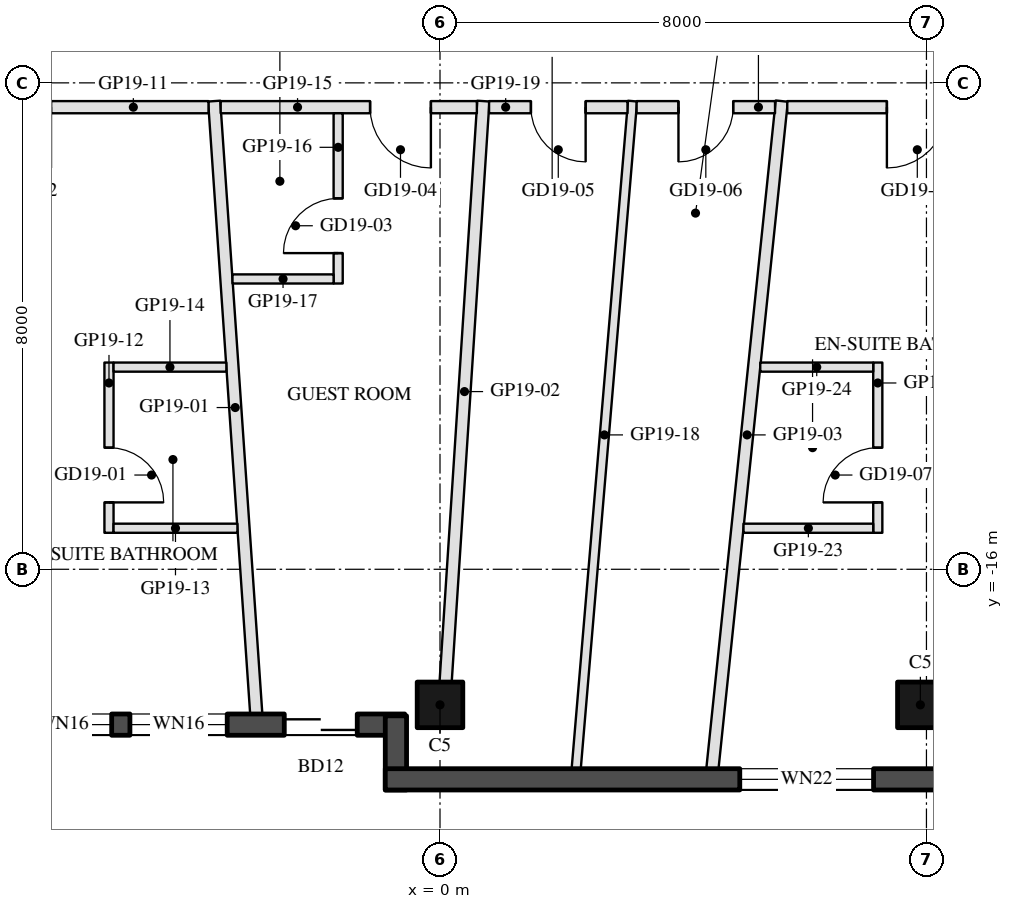
"""IFC4 building model, lengths in metres.
Left out: names, types, materials, properties, quantities, classifications, styles, units other than length and angle.
Written with IfcOpenShell. Run it as: python <this file> out.ifc"""

import sys

from ifc_helpers import new_model, si_unit, direction, frame, frame_2d, origin, origin_2d, place, context, subcontext, project, spatial, rectangle, hollow_rectangle, extrude, element, fill, save


model = new_model("IFC4")
c1 = context("Model", 3, precision=1e-05, world=origin(), true_north=direction((0.0, 1.0)))
c2 = subcontext(c1, "Body", "Model", "MODEL_VIEW")
j1 = project(units=[si_unit("LENGTHUNIT", "METRE"), si_unit("PLANEANGLEUNIT", "RADIAN")], contexts=[c1])
p1 = place(None, origin())
s1 = spatial("IfcSite", under=j1, at=p1, CompositionType="ELEMENT")
p2 = place(p1, origin())
s2 = spatial("IfcBuilding", under=s1, at=p2, CompositionType="ELEMENT")
p3 = place(p2, frame((0.0, 0.0, 202.1)))
s3 = spatial("IfcBuildingStorey", under=s2, at=p3, CompositionType="ELEMENT", Elevation=202.1)
for number, where, z_axis, x_axis in (
    (1, (0.0, -18.23, 0.0), (0.0, 0.0, 1.0), (-1.0, 0.0, 0.0)),
    (2, (7.9, -18.23, 0.0), (0.0, 0.0, 1.0), (-1.0, 0.0, 0.0)),
):
    element("IfcColumn", number, at=place(p3, frame(where, z_axis=z_axis, x_axis=x_axis)), inside=s3, PredefinedType="COLUMN", context=c2, shape_type="SweptSolid", body=[
        extrude(hollow_rectangle(XDim=0.75, YDim=0.75, WallThickness=0.035, at=origin_2d()), origin(), (0.0, 0.0, 1.0), 3.7),
    ])
p4 = place(p3, frame((-7.32, -18.555, 0.0), z_axis=(0.0, 0.0, 1.0), x_axis=(1.0, 0.0, 0.0)))
e3 = element("IfcWall", 3, at=p4, inside=s3, PredefinedType="SOLIDWALL", context=c2, shape_type="SweptSolid", body=[
    extrude(rectangle(XDim=6.74, YDim=0.35, at=frame_2d((3.37, 0.0))), origin(), (0.0, 0.0, 1.0), 3.55),
])
p5 = place(p4, frame((0.32, 0.0, 0.3)))
e4 = element("IfcOpeningElement", 4, at=p5, cuts=e3, PredefinedType="OPENING", context=c2, shape_type="SweptSolid", body=[
    extrude(rectangle(XDim=1.6, YDim=2.65, at=frame_2d((0.8, 1.325))), frame((0.0, 0.185, 0.0), z_axis=(0.0, -1.0, 0.0), x_axis=(1.0, 0.0, 0.0)), (0.0, 0.0, 1.0), 0.37),
])
p6 = place(p4, frame((2.22, 0.0, 0.3)))
e5 = element("IfcOpeningElement", 5, at=p6, cuts=e3, PredefinedType="OPENING", context=c2, shape_type="SweptSolid", body=[
    extrude(rectangle(XDim=1.6, YDim=2.65, at=frame_2d((0.8, 1.325))), frame((0.0, 0.185, 0.0), z_axis=(0.0, -1.0, 0.0), x_axis=(1.0, 0.0, 0.0)), (0.0, 0.0, 1.0), 0.37),
])
p7 = place(p4, frame((4.759, 0.0, 0.0)))
e6 = element("IfcOpeningElement", 6, at=p7, cuts=e3, PredefinedType="OPENING", context=c2, shape_type="SweptSolid", body=[
    extrude(rectangle(XDim=1.2, YDim=2.4, at=frame_2d((0.6, 1.2))), frame((0.0, 0.185, 0.0), z_axis=(0.0, -1.0, 0.0), x_axis=(1.0, 0.0, 0.0)), (0.0, 0.0, 1.0), 0.37),
])
p8 = place(p3, frame((-0.725, -18.41, 0.0), z_axis=(0.0, 0.0, 1.0), x_axis=(0.0, -1.0, 0.0)))
e7 = element("IfcWall", 7, at=p8, inside=s3, PredefinedType="SOLIDWALL", context=c2, shape_type="SweptSolid", body=[
    extrude(rectangle(XDim=1.22, YDim=0.35, at=frame_2d((0.61, 0.0))), origin(), (0.0, 0.0, 1.0), 3.55),
])
p9 = place(p3, frame((-0.9, -19.455, 0.0), z_axis=(0.0, 0.0, 1.0), x_axis=(1.0, 0.0, 0.0)))
e8 = element("IfcWall", 8, at=p9, inside=s3, PredefinedType="SOLIDWALL", context=c2, shape_type="SweptSolid", body=[
    extrude(rectangle(XDim=9.7, YDim=0.35, at=frame_2d((4.85, 0.0))), origin(), (0.0, 0.0, 1.0), 3.55),
])
p10 = place(p9, frame((5.83, 0.0, 0.3)))
e9 = element("IfcOpeningElement", 9, at=p10, cuts=e8, PredefinedType="OPENING", context=c2, shape_type="SweptSolid", body=[
    extrude(rectangle(XDim=2.2, YDim=2.65, at=frame_2d((1.1, 1.325))), frame((0.0, 0.185, 0.0), z_axis=(0.0, -1.0, 0.0), x_axis=(1.0, 0.0, 0.0)), (0.0, 0.0, 1.0), 0.37),
])
p11 = place(p3, frame((-3.022, -18.38, 0.0), z_axis=(0.0, 0.0, 1.0), x_axis=(-0.068480322914, 0.997652467232, 0.0)))
e10 = element("IfcWall", 10, at=p11, inside=s3, PredefinedType="PARTITIONING", context=c2, shape_type="SweptSolid", body=[
    extrude(rectangle(XDim=10.104, YDim=0.2, at=frame_2d((5.052, 0.0))), origin(), (0.0, 0.0, 1.0), 3.06),
])
p12 = place(p3, frame((0.093, -17.855, 0.0), z_axis=(0.0, 0.0, 1.0), x_axis=(0.064789362054, 0.997898962102, 0.0)))
e11 = element("IfcWall", 11, at=p12, inside=s3, PredefinedType="PARTITIONING", context=c2, shape_type="SweptSolid", body=[
    extrude(rectangle(XDim=9.575, YDim=0.2, at=frame_2d((4.788, 0.0))), origin(), (0.0, 0.0, 1.0), 2.95),
])
p13 = place(p3, frame((4.48, -19.28, 0.0), z_axis=(0.0, 0.0, 1.0), x_axis=(0.103348095524, 0.994645248896, 0.0)))
e12 = element("IfcWall", 12, at=p13, inside=s3, PredefinedType="PARTITIONING", context=c2, shape_type="SweptSolid", body=[
    extrude(rectangle(XDim=11.039, YDim=0.2, at=frame_2d((5.52, 0.0))), origin(), (0.0, 0.0, 1.0), 3.06),
])
p14 = place(p3, frame((-3.807, -8.4, 0.0), z_axis=(0.0, 0.0, 1.0), x_axis=(-1.0, 0.0, 0.0)))
e13 = element("IfcWall", 13, at=p14, inside=s3, PredefinedType="PARTITIONING", context=c2, shape_type="SweptSolid", body=[
    extrude(rectangle(XDim=6.181, YDim=0.2, at=frame_2d((3.091, 0.0))), origin(), (0.0, 0.0, 1.0), 2.95),
])
p15 = place(p14, frame((2.591, 0.0, 0.0)))
e14 = element("IfcOpeningElement", 14, at=p15, cuts=e13, PredefinedType="OPENING", context=c2, shape_type="SweptSolid", body=[
    extrude(rectangle(XDim=1.0, YDim=2.1, at=frame_2d((0.5, 1.05))), frame((0.0, 0.11, 0.0), z_axis=(0.0, -1.0, 0.0), x_axis=(1.0, 0.0, 0.0)), (0.0, 0.0, 1.0), 0.22),
])
p16 = place(p3, frame((-5.444, -12.6, 0.0), z_axis=(0.0, 0.0, 1.0), x_axis=(0.0, -1.0, 0.0)))
e15 = element("IfcWall", 15, at=p16, inside=s3, PredefinedType="PARTITIONING", context=c2, shape_type="SweptSolid", body=[
    extrude(rectangle(XDim=2.8, YDim=0.15, at=frame_2d((1.4, 0.0))), origin(), (0.0, 0.0, 1.0), 3.55),
])
p17 = place(p16, frame((1.4, 0.0, 0.0)))
e16 = element("IfcOpeningElement", 16, at=p17, cuts=e15, PredefinedType="OPENING", context=c2, shape_type="SweptSolid", body=[
    extrude(rectangle(XDim=0.9, YDim=2.1, at=frame_2d((0.45, 1.05))), frame((0.0, 0.085, 0.0), z_axis=(0.0, -1.0, 0.0), x_axis=(1.0, 0.0, 0.0)), (0.0, 0.0, 1.0), 0.17),
])
p18 = place(p3, frame((-5.369, -15.325, 0.0), z_axis=(0.0, 0.0, 1.0), x_axis=(1.0, 0.0, 0.0)))
e17 = element("IfcWall", 17, at=p18, inside=s3, PredefinedType="PARTITIONING", context=c2, shape_type="SweptSolid", body=[
    extrude(rectangle(XDim=2.037, YDim=0.15, at=frame_2d((1.019, 0.0))), origin(), (0.0, 0.0, 1.0), 2.95),
])
p19 = place(p3, frame((-5.369, -12.675, 0.0), z_axis=(0.0, 0.0, 1.0), x_axis=(1.0, 0.0, 0.0)))
e18 = element("IfcWall", 18, at=p19, inside=s3, PredefinedType="PARTITIONING", context=c2, shape_type="SweptSolid", body=[
    extrude(rectangle(XDim=1.855, YDim=0.15, at=frame_2d((0.928, 0.0))), origin(), (0.0, 0.0, 1.0), 2.95),
])
p20 = place(p3, frame((0.606, -8.4, 0.0), z_axis=(0.0, 0.0, 1.0), x_axis=(-1.0, 0.0, 0.0)))
e19 = element("IfcWall", 19, at=p20, inside=s3, PredefinedType="PARTITIONING", context=c2, shape_type="SweptSolid", body=[
    extrude(rectangle(XDim=4.213, YDim=0.2, at=frame_2d((2.106, 0.0))), origin(), (0.0, 0.0, 1.0), 2.95),
])
p21 = place(p20, frame((0.756, 0.0, 0.0)))
e20 = element("IfcOpeningElement", 20, at=p21, cuts=e19, PredefinedType="OPENING", context=c2, shape_type="SweptSolid", body=[
    extrude(rectangle(XDim=1.0, YDim=2.1, at=frame_2d((0.5, 1.05))), frame((0.0, 0.11, 0.0), z_axis=(0.0, -1.0, 0.0), x_axis=(1.0, 0.0, 0.0)), (0.0, 0.0, 1.0), 0.22),
])
p22 = place(p3, frame((-1.675, -11.3, 0.0), z_axis=(0.0, 0.0, 1.0), x_axis=(0.0, 1.0, 0.0)))
e21 = element("IfcWall", 21, at=p22, inside=s3, PredefinedType="PARTITIONING", context=c2, shape_type="SweptSolid", body=[
    extrude(rectangle(XDim=2.8, YDim=0.15, at=frame_2d((1.4, 0.0))), origin(), (0.0, 0.0, 1.0), 3.55),
])
p23 = place(p22, frame((0.5, 0.0, 0.0)))
e22 = element("IfcOpeningElement", 22, at=p23, cuts=e21, PredefinedType="OPENING", context=c2, shape_type="SweptSolid", body=[
    extrude(rectangle(XDim=0.9, YDim=2.1, at=frame_2d((0.45, 1.05))), frame((0.0, 0.085, 0.0), z_axis=(0.0, -1.0, 0.0), x_axis=(1.0, 0.0, 0.0)), (0.0, 0.0, 1.0), 0.17),
])
p24 = place(p3, frame((-3.413, -11.225, 0.0), z_axis=(0.0, 0.0, 1.0), x_axis=(1.0, 0.0, 0.0)))
e23 = element("IfcWall", 23, at=p24, inside=s3, PredefinedType="PARTITIONING", context=c2, shape_type="SweptSolid", body=[
    extrude(rectangle(XDim=1.663, YDim=0.15, at=frame_2d((0.832, 0.0))), origin(), (0.0, 0.0, 1.0), 3.55),
])
p25 = place(p3, frame((2.24, -19.28, 0.0), z_axis=(0.0, 0.0, 1.0), x_axis=(0.084127266942, 0.99645501803, 0.0)))
e24 = element("IfcWall", 24, at=p25, inside=s3, PredefinedType="PARTITIONING", context=c2, shape_type="SweptSolid", body=[
    extrude(rectangle(XDim=11.019, YDim=0.15, at=frame_2d((5.51, 0.0))), origin(), (0.0, 0.0, 1.0), 3.06),
])
p26 = place(p3, frame((3.083, -8.4, 0.0), z_axis=(0.0, 0.0, 1.0), x_axis=(-1.0, 0.0, 0.0)))
e25 = element("IfcWall", 25, at=p26, inside=s3, PredefinedType="PARTITIONING", context=c2, shape_type="SweptSolid", body=[
    extrude(rectangle(XDim=2.277, YDim=0.2, at=frame_2d((1.138, 0.0))), origin(), (0.0, 0.0, 1.0), 3.55),
])
p27 = place(p26, frame((0.688, 0.0, 0.0)))
e26 = element("IfcOpeningElement", 26, at=p27, cuts=e25, PredefinedType="OPENING", context=c2, shape_type="SweptSolid", body=[
    extrude(rectangle(XDim=0.9, YDim=2.1, at=frame_2d((0.45, 1.05))), frame((0.0, 0.11, 0.0), z_axis=(0.0, -1.0, 0.0), x_axis=(1.0, 0.0, 0.0)), (0.0, 0.0, 1.0), 0.22),
])
p28 = place(p3, frame((5.51, -8.4, 0.0), z_axis=(0.0, 0.0, 1.0), x_axis=(-1.0, 0.0, 0.0)))
e27 = element("IfcWall", 27, at=p28, inside=s3, PredefinedType="PARTITIONING", context=c2, shape_type="SweptSolid", body=[
    extrude(rectangle(XDim=2.277, YDim=0.2, at=frame_2d((1.138, 0.0))), origin(), (0.0, 0.0, 1.0), 2.95),
])
p29 = place(p28, frame((0.688, 0.0, 0.0)))
e28 = element("IfcOpeningElement", 28, at=p29, cuts=e27, PredefinedType="OPENING", context=c2, shape_type="SweptSolid", body=[
    extrude(rectangle(XDim=0.9, YDim=2.1, at=frame_2d((0.45, 1.05))), frame((0.0, 0.11, 0.0), z_axis=(0.0, -1.0, 0.0), x_axis=(1.0, 0.0, 0.0)), (0.0, 0.0, 1.0), 0.22),
])
p30 = place(p3, frame((9.988, -8.4, 0.0), z_axis=(0.0, 0.0, 1.0), x_axis=(-1.0, 0.0, 0.0)))
e29 = element("IfcWall", 29, at=p30, inside=s3, PredefinedType="PARTITIONING", context=c2, shape_type="SweptSolid", body=[
    extrude(rectangle(XDim=4.277, YDim=0.2, at=frame_2d((2.139, 0.0))), origin(), (0.0, 0.0, 1.0), 2.95),
])
p31 = place(p30, frame((1.639, 0.0, 0.0)))
e30 = element("IfcOpeningElement", 30, at=p31, cuts=e29, PredefinedType="OPENING", context=c2, shape_type="SweptSolid", body=[
    extrude(rectangle(XDim=1.0, YDim=2.1, at=frame_2d((0.5, 1.05))), frame((0.0, 0.11, 0.0), z_axis=(0.0, -1.0, 0.0), x_axis=(1.0, 0.0, 0.0)), (0.0, 0.0, 1.0), 0.22),
])
p32 = place(p3, frame((7.2, -15.4, 0.0), z_axis=(0.0, 0.0, 1.0), x_axis=(0.0, 1.0, 0.0)))
e31 = element("IfcWall", 31, at=p32, inside=s3, PredefinedType="PARTITIONING", context=c2, shape_type="SweptSolid", body=[
    extrude(rectangle(XDim=2.8, YDim=0.15, at=frame_2d((1.4, 0.0))), origin(), (0.0, 0.0, 1.0), 3.55),
])
p33 = place(p32, frame((0.5, 0.0, 0.0)))
e32 = element("IfcOpeningElement", 32, at=p33, cuts=e31, PredefinedType="OPENING", context=c2, shape_type="SweptSolid", body=[
    extrude(rectangle(XDim=0.9, YDim=2.1, at=frame_2d((0.45, 1.05))), frame((0.0, 0.085, 0.0), z_axis=(0.0, -1.0, 0.0), x_axis=(1.0, 0.0, 0.0)), (0.0, 0.0, 1.0), 0.17),
])
p34 = place(p3, frame((4.991, -15.325, 0.0), z_axis=(0.0, 0.0, 1.0), x_axis=(1.0, 0.0, 0.0)))
e33 = element("IfcWall", 33, at=p34, inside=s3, PredefinedType="PARTITIONING", context=c2, shape_type="SweptSolid", body=[
    extrude(rectangle(XDim=2.133, YDim=0.15, at=frame_2d((1.066, 0.0))), origin(), (0.0, 0.0, 1.0), 3.55),
])
p35 = place(p3, frame((5.267, -12.675, 0.0), z_axis=(0.0, 0.0, 1.0), x_axis=(1.0, 0.0, 0.0)))
e34 = element("IfcWall", 34, at=p35, inside=s3, PredefinedType="PARTITIONING", context=c2, shape_type="SweptSolid", body=[
    extrude(rectangle(XDim=1.858, YDim=0.15, at=frame_2d((0.929, 0.0))), origin(), (0.0, 0.0, 1.0), 3.55),
])
p36 = place(p5, origin())
e35 = element("IfcWindow", 35, at=p36, inside=s3, PartitioningType="SINGLE_PANEL", PredefinedType="WINDOW", context=c2, shape_type="SweptSolid", body=[
    extrude(rectangle(XDim=1.6, YDim=2.65, at=frame_2d((0.8, 1.325))), frame((0.0, 0.03, 0.0), z_axis=(0.0, -1.0, 0.0), x_axis=(1.0, 0.0, 0.0)), (0.0, 0.0, 1.0), 0.06),
])
fill(e4, e35)
p37 = place(p6, origin())
e36 = element("IfcWindow", 36, at=p37, inside=s3, PartitioningType="SINGLE_PANEL", PredefinedType="WINDOW", context=c2, shape_type="SweptSolid", body=[
    extrude(rectangle(XDim=1.6, YDim=2.65, at=frame_2d((0.8, 1.325))), frame((0.0, 0.03, 0.0), z_axis=(0.0, -1.0, 0.0), x_axis=(1.0, 0.0, 0.0)), (0.0, 0.0, 1.0), 0.06),
])
fill(e5, e36)
p38 = place(p7, frame((1.2, 0.0, 0.0), z_axis=(0.0, 0.0, 1.0), x_axis=(-1.0, 0.0, 0.0)))
e37 = element("IfcDoor", 37, at=p38, inside=s3, OperationType="SLIDING_TO_LEFT", PredefinedType="DOOR", context=c2, shape_type="SweptSolid", body=[
    extrude(rectangle(XDim=1.2, YDim=2.4, at=frame_2d((0.6, 1.2))), frame((0.0, 0.025, 0.0), z_axis=(0.0, -1.0, 0.0), x_axis=(1.0, 0.0, 0.0)), (0.0, 0.0, 1.0), 0.05),
])
fill(e6, e37)
p39 = place(p10, origin())
e38 = element("IfcWindow", 38, at=p39, inside=s3, PartitioningType="SINGLE_PANEL", PredefinedType="WINDOW", context=c2, shape_type="SweptSolid", body=[
    extrude(rectangle(XDim=2.2, YDim=2.65, at=frame_2d((1.1, 1.325))), frame((0.0, 0.03, 0.0), z_axis=(0.0, -1.0, 0.0), x_axis=(1.0, 0.0, 0.0)), (0.0, 0.0, 1.0), 0.06),
])
fill(e9, e38)
p40 = place(p17, origin())
e39 = element("IfcDoor", 39, at=p40, inside=s3, OperationType="SINGLE_SWING_RIGHT", PredefinedType="DOOR", context=c2, shape_type="SweptSolid", body=[
    extrude(rectangle(XDim=0.9, YDim=2.1, at=frame_2d((0.45, 1.05))), frame((0.0, 0.025, 0.0), z_axis=(0.0, -1.0, 0.0), x_axis=(1.0, 0.0, 0.0)), (0.0, 0.0, 1.0), 0.05),
])
fill(e16, e39)
p41 = place(p23, origin())
e40 = element("IfcDoor", 40, at=p41, inside=s3, OperationType="SINGLE_SWING_LEFT", PredefinedType="DOOR", context=c2, shape_type="SweptSolid", body=[
    extrude(rectangle(XDim=0.9, YDim=2.1, at=frame_2d((0.45, 1.05))), frame((0.0, 0.025, 0.0), z_axis=(0.0, -1.0, 0.0), x_axis=(1.0, 0.0, 0.0)), (0.0, 0.0, 1.0), 0.05),
])
fill(e22, e40)
p42 = place(p21, origin())
e41 = element("IfcDoor", 41, at=p42, inside=s3, OperationType="SINGLE_SWING_LEFT", PredefinedType="DOOR", context=c2, shape_type="SweptSolid", body=[
    extrude(rectangle(XDim=1.0, YDim=2.1, at=frame_2d((0.5, 1.05))), frame((0.0, 0.025, 0.0), z_axis=(0.0, -1.0, 0.0), x_axis=(1.0, 0.0, 0.0)), (0.0, 0.0, 1.0), 0.05),
])
fill(e20, e41)
p43 = place(p27, origin())
e42 = element("IfcDoor", 42, at=p43, inside=s3, OperationType="SINGLE_SWING_LEFT", PredefinedType="DOOR", context=c2, shape_type="SweptSolid", body=[
    extrude(rectangle(XDim=0.9, YDim=2.1, at=frame_2d((0.45, 1.05))), frame((0.0, 0.025, 0.0), z_axis=(0.0, -1.0, 0.0), x_axis=(1.0, 0.0, 0.0)), (0.0, 0.0, 1.0), 0.05),
])
fill(e26, e42)
p44 = place(p29, origin())
e43 = element("IfcDoor", 43, at=p44, inside=s3, OperationType="SINGLE_SWING_RIGHT", PredefinedType="DOOR", context=c2, shape_type="SweptSolid", body=[
    extrude(rectangle(XDim=0.9, YDim=2.1, at=frame_2d((0.45, 1.05))), frame((0.0, 0.025, 0.0), z_axis=(0.0, -1.0, 0.0), x_axis=(1.0, 0.0, 0.0)), (0.0, 0.0, 1.0), 0.05),
])
fill(e28, e43)
p45 = place(p33, origin())
e44 = element("IfcDoor", 44, at=p45, inside=s3, OperationType="SINGLE_SWING_LEFT", PredefinedType="DOOR", context=c2, shape_type="SweptSolid", body=[
    extrude(rectangle(XDim=0.9, YDim=2.1, at=frame_2d((0.45, 1.05))), frame((0.0, 0.025, 0.0), z_axis=(0.0, -1.0, 0.0), x_axis=(1.0, 0.0, 0.0)), (0.0, 0.0, 1.0), 0.05),
])
fill(e32, e44)
p46 = place(p31, origin())
e45 = element("IfcDoor", 45, at=p46, inside=s3, OperationType="SINGLE_SWING_RIGHT", PredefinedType="DOOR", context=c2, shape_type="SweptSolid", body=[
    extrude(rectangle(XDim=1.0, YDim=2.1, at=frame_2d((0.5, 1.05))), frame((0.0, 0.025, 0.0), z_axis=(0.0, -1.0, 0.0), x_axis=(1.0, 0.0, 0.0)), (0.0, 0.0, 1.0), 0.05),
])
fill(e30, e45)
save(model, sys.argv[1])
